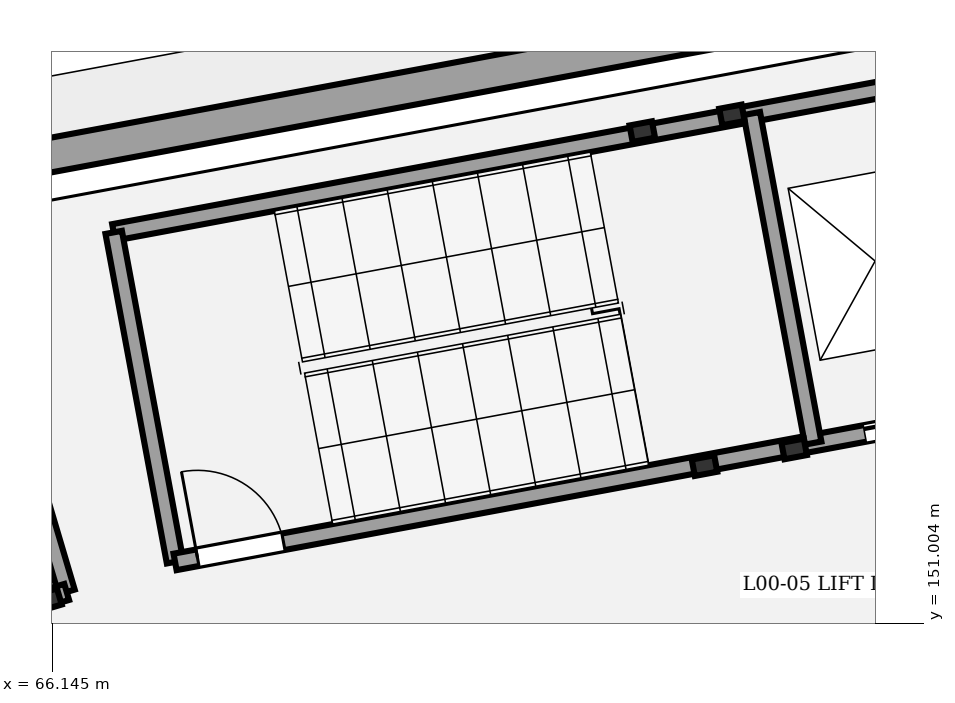
"""IFC4 building model, lengths in metres.
Left out: names, types, materials, properties, quantities, classifications, styles, units other than length and angle.
Written with IfcOpenShell. Run it as: python <this file> out.ifc"""

import sys

from ifc_helpers import new_model, si_unit, direction, frame, frame_2d, origin, origin_2d, place, context, subcontext, project, spatial, rectangle, extrude, element, fill, save


model = new_model("IFC4")
c1 = context("Model", 3, precision=1e-05, world=origin(), true_north=direction((0.0, 1.0)))
c2 = subcontext(c1, "Body", "Model", "MODEL_VIEW")
j1 = project(units=[si_unit("LENGTHUNIT", "METRE"), si_unit("PLANEANGLEUNIT", "RADIAN")], contexts=[c1])
p1 = place(None, origin())
s1 = spatial("IfcSite", under=j1, at=p1, CompositionType="ELEMENT")
p2 = place(p1, origin())
s2 = spatial("IfcBuilding", under=s1, at=p2, CompositionType="ELEMENT")
p3 = place(p2, origin())
s3 = spatial("IfcBuildingStorey", under=s2, at=p3, CompositionType="ELEMENT", Elevation=0.0)
p4 = place(p3, frame((77.647, 159.309, 0.0), z_axis=(0.0, 0.0, 1.0), x_axis=(-0.983095830164, -0.183091749443, 0.0)))
e1 = element("IfcWall", 1, at=p4, inside=s3, PredefinedType="USERDEFINED", context=c2, shape_type="SweptSolid", body=[
    extrude(rectangle(XDim=13.045, YDim=0.45, at=frame_2d((6.522, 0.0))), origin(), (0.0, 0.0, 1.0), 4.25),
])
for number, where, z_axis, x_axis in (
    (2, (74.729, 153.078, 0.0), (0.0, 0.0, 1.0), (0.983, 0.183, 0.0)),
    (3, (75.908, 153.298, 0.0), (0.0, 0.0, 1.0), (0.983, 0.183, 0.0)),
    (4, (75.09, 157.692, 0.0), (0.0, 0.0, 1.0), (0.983, 0.183, 0.0)),
    (5, (73.91, 157.473, 0.0), (0.0, 0.0, 1.0), (0.983, 0.183, 0.0)),
):
    element("IfcColumn", number, at=place(p3, frame(where, z_axis=z_axis, x_axis=x_axis)), inside=s3, PredefinedType="COLUMN", context=c2, shape_type="SweptSolid", body=[
        extrude(rectangle(XDim=0.3, YDim=0.22, at=origin_2d()), origin(), (0.0, 0.0, 1.0), 5.4),
    ])
p5 = place(p3, frame((66.955, 156.147, 0.0), z_axis=(0.0, 0.0, 1.0), x_axis=(0.983093434234, 0.183104613723, 0.0)))
e6 = element("IfcWall", 6, at=p5, inside=s3, PredefinedType="SHEAR", context=c2, shape_type="SweptSolid", body=[
    extrude(rectangle(XDim=11.02, YDim=0.22, at=frame_2d((5.51, 0.0))), origin(), (0.0, 0.0, 1.0), 5.15),
])
p6 = place(p3, frame((67.763, 151.811, 0.0), z_axis=(0.0, 0.0, 1.0), x_axis=(-0.183078394814, 0.983098317236, 0.0)))
e7 = element("IfcWall", 7, at=p6, inside=s3, PredefinedType="SHEAR", context=c2, shape_type="SweptSolid", body=[
    extrude(rectangle(XDim=4.41, YDim=0.22, at=frame_2d((2.205, 0.0))), origin(), (0.0, 0.0, 1.0), 5.15),
])
p7 = place(p3, frame((67.763, 151.811, 0.0), z_axis=(0.0, 0.0, 1.0), x_axis=(0.983093434234, 0.183104613723, 0.0)))
e8 = element("IfcWall", 8, at=p7, inside=s3, PredefinedType="SHEAR", context=c2, shape_type="SweptSolid", body=[
    extrude(rectangle(XDim=11.02, YDim=0.22, at=frame_2d((5.51, 0.0))), origin(), (0.0, 0.0, 1.0), 5.15),
])
p8 = place(p7, frame((0.3, 0.0, 0.0)))
e9 = element("IfcOpeningElement", 9, at=p8, cuts=e8, PredefinedType="OPENING", context=c2, shape_type="SweptSolid", body=[
    extrude(rectangle(XDim=1.15, YDim=2.15, at=frame_2d((0.575, 1.075))), frame((0.0, 0.12, 0.0), z_axis=(0.0, -1.0, 0.0), x_axis=(1.0, 0.0, 0.0)), (0.0, 0.0, 1.0), 0.24),
])
p9 = place(p7, frame((9.23, 0.0, 0.0)))
e10 = element("IfcOpeningElement", 10, at=p9, cuts=e8, PredefinedType="OPENING", context=c2, shape_type="SweptSolid", body=[
    extrude(rectangle(XDim=1.1, YDim=2.15, at=frame_2d((0.55, 1.075))), frame((0.0, 0.12, 0.0), z_axis=(0.0, -1.0, 0.0), x_axis=(1.0, 0.0, 0.0)), (0.0, 0.0, 1.0), 0.24),
])
p10 = place(p3, frame((76.158, 153.375, 0.0), z_axis=(0.0, 0.0, 1.0), x_axis=(-0.183078394814, 0.983098317236, 0.0)))
e11 = element("IfcWall", 11, at=p10, inside=s3, PredefinedType="SHEAR", context=c2, shape_type="SweptSolid", body=[
    extrude(rectangle(XDim=4.41, YDim=0.22, at=frame_2d((2.205, 0.0))), origin(), (0.0, 0.0, 1.0), 5.15),
])
p11 = place(p3, frame((66.096, 151.313, 0.0), z_axis=(0.0, 0.0, 1.0), x_axis=(0.958670893355, 0.284517342588, 0.0)))
e12 = element("IfcColumn", 12, at=p11, inside=s3, PredefinedType="COLUMN", context=c2, shape_type="SweptSolid", body=[
    extrude(rectangle(XDim=0.3, YDim=0.22, at=origin_2d()), origin(), (0.0, 0.0, 1.0), 5.4),
])
p12 = place(p3, frame((66.337, 151.416, 0.0), z_axis=(0.0, 0.0, 1.0), x_axis=(-0.284497328872, 0.958676832861, 0.0)))
e13 = element("IfcWall", 13, at=p12, inside=s3, PredefinedType="SHEAR", context=c2, shape_type="SweptSolid", body=[
    extrude(rectangle(XDim=4.41, YDim=0.22, at=frame_2d((2.205, 0.0))), origin(), (0.0, 0.0, 1.0), 5.15),
])
p13 = place(p3, frame((58.15, 148.986, 0.0), z_axis=(0.0, 0.0, 1.0), x_axis=(0.958665631999, 0.284535069937, 0.0)))
e14 = element("IfcWall", 14, at=p13, inside=s3, PredefinedType="SHEAR", context=c2, shape_type="SweptSolid", body=[
    extrude(rectangle(XDim=8.54, YDim=0.22, at=frame_2d((4.27, 0.0))), origin(), (0.0, 0.0, 1.0), 5.15),
])
p14 = place(p13, frame((0.3, 0.0, 0.0)))
e15 = element("IfcOpeningElement", 15, at=p14, cuts=e14, PredefinedType="OPENING", context=c2, shape_type="SweptSolid", body=[
    extrude(rectangle(XDim=1.15, YDim=2.15, at=frame_2d((0.575, 1.075))), frame((0.0, 0.12, 0.0), z_axis=(0.0, -1.0, 0.0), x_axis=(1.0, 0.0, 0.0)), (0.0, 0.0, 1.0), 0.24),
])
p15 = place(p8, origin())
e16 = element("IfcDoor", 16, at=p15, inside=s3, OperationType="SINGLE_SWING_LEFT", PredefinedType="DOOR", context=c2, shape_type="SweptSolid", body=[
    extrude(rectangle(XDim=1.15, YDim=2.15, at=frame_2d((0.575, 1.075))), frame((0.0, 0.025, 0.0), z_axis=(0.0, -1.0, 0.0), x_axis=(1.0, 0.0, 0.0)), (0.0, 0.0, 1.0), 0.05),
])
fill(e9, e16)
p16 = place(p9, origin())
e17 = element("IfcDoor", 17, at=p16, inside=s3, OperationType="DOUBLE_DOOR_SLIDING", PredefinedType="DOOR", context=c2, shape_type="SweptSolid", body=[
    extrude(rectangle(XDim=1.1, YDim=2.15, at=frame_2d((0.55, 1.075))), frame((0.0, 0.025, 0.0), z_axis=(0.0, -1.0, 0.0), x_axis=(1.0, 0.0, 0.0)), (0.0, 0.0, 1.0), 0.05),
])
fill(e10, e17)
save(model, sys.argv[1])
